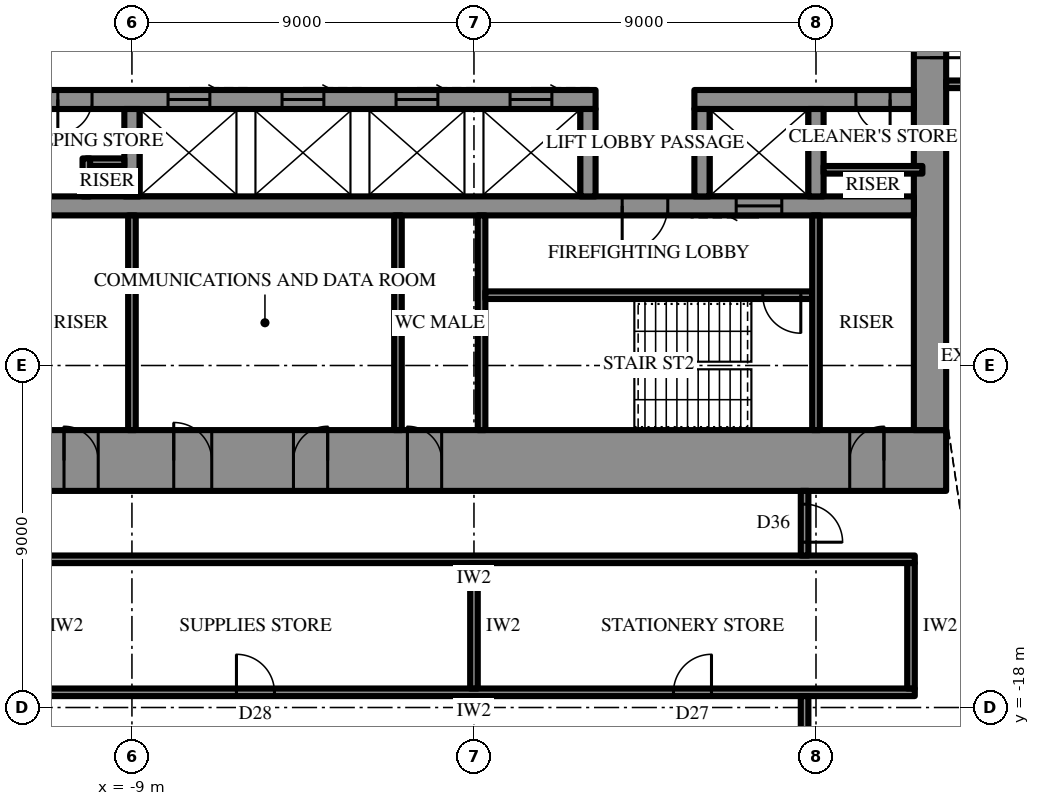
"""IFC4 building model, lengths in metres.
Left out: names, types, materials, properties, quantities, classifications, styles, units other than length and angle.
Written with IfcOpenShell. Run it as: python <this file> out.ifc"""

import sys

from ifc_helpers import new_model, si_unit, direction, frame, frame_2d, origin, place, context, subcontext, project, spatial, rectangle, extrude, element, fill, save


model = new_model("IFC4")
c1 = context("Model", 3, precision=1e-05, world=origin(), true_north=direction((0.0, 1.0)))
c2 = subcontext(c1, "Body", "Model", "MODEL_VIEW")
j1 = project(units=[si_unit("LENGTHUNIT", "METRE"), si_unit("PLANEANGLEUNIT", "RADIAN")], contexts=[c1])
p1 = place(None, origin())
s1 = spatial("IfcSite", under=j1, at=p1, CompositionType="ELEMENT")
p2 = place(p1, origin())
s2 = spatial("IfcBuilding", under=s1, at=p2, CompositionType="ELEMENT")
p3 = place(p2, frame((0.0, 0.0, 349.3)))
s3 = spatial("IfcBuildingStorey", under=s2, at=p3, CompositionType="ELEMENT", Elevation=349.3)
p4 = place(p3, frame((12.425, -11.5, 0.0), z_axis=(0.0, 0.0, 1.0), x_axis=(-1.0, 0.0, 0.0)))
e1 = element("IfcWall", 1, at=p4, inside=s3, PredefinedType="SHEAR", context=c2, shape_type="SweptSolid", body=[
    extrude(rectangle(XDim=24.85, YDim=1.6, at=frame_2d((12.425, 0.0))), origin(), (0.0, 0.0, 1.0), 4.2),
])
p5 = place(p4, frame((13.275, 0.0, 0.0)))
e2 = element("IfcOpeningElement", 2, at=p5, cuts=e1, PredefinedType="OPENING", context=c2, shape_type="SweptSolid", body=[
    extrude(rectangle(XDim=0.9, YDim=2.2, at=frame_2d((0.45, 1.1))), frame((0.0, 0.81, 0.0), z_axis=(0.0, -1.0, 0.0), x_axis=(1.0, 0.0, 0.0)), (0.0, 0.0, 1.0), 1.62),
])
p6 = place(p4, frame((16.275, 0.0, 0.0)))
e3 = element("IfcOpeningElement", 3, at=p6, cuts=e1, PredefinedType="OPENING", context=c2, shape_type="SweptSolid", body=[
    extrude(rectangle(XDim=0.9, YDim=2.2, at=frame_2d((0.45, 1.1))), frame((0.0, 0.81, 0.0), z_axis=(0.0, -1.0, 0.0), x_axis=(1.0, 0.0, 0.0)), (0.0, 0.0, 1.0), 1.62),
])
p7 = place(p4, frame((19.325, 0.0, 0.0)))
e4 = element("IfcOpeningElement", 4, at=p7, cuts=e1, PredefinedType="OPENING", context=c2, shape_type="SweptSolid", body=[
    extrude(rectangle(XDim=1.0, YDim=2.2, at=frame_2d((0.5, 1.1))), frame((0.0, 0.81, 0.0), z_axis=(0.0, -1.0, 0.0), x_axis=(1.0, 0.0, 0.0)), (0.0, 0.0, 1.0), 1.62),
])
p8 = place(p4, frame((1.637, 0.0, 0.0)))
e5 = element("IfcOpeningElement", 5, at=p8, cuts=e1, PredefinedType="OPENING", context=c2, shape_type="SweptSolid", body=[
    extrude(rectangle(XDim=0.9, YDim=2.2, at=frame_2d((0.45, 1.1))), frame((0.0, 0.81, 0.0), z_axis=(0.0, -1.0, 0.0), x_axis=(1.0, 0.0, 0.0)), (0.0, 0.0, 1.0), 1.62),
])
p9 = place(p4, frame((22.312, 0.0, 0.0)))
e6 = element("IfcOpeningElement", 6, at=p9, cuts=e1, PredefinedType="OPENING", context=c2, shape_type="SweptSolid", body=[
    extrude(rectangle(XDim=0.9, YDim=2.2, at=frame_2d((0.45, 1.1))), frame((0.0, 0.81, 0.0), z_axis=(0.0, -1.0, 0.0), x_axis=(1.0, 0.0, 0.0)), (0.0, 0.0, 1.0), 1.62),
])
p10 = place(p3, frame((12.0, -10.7, 0.0), z_axis=(0.0, 0.0, 1.0), x_axis=(0.0, 1.0, 0.0)))
e7 = element("IfcWall", 7, at=p10, inside=s3, PredefinedType="SHEAR", context=c2, shape_type="SweptSolid", body=[
    extrude(rectangle(XDim=21.4, YDim=0.85, at=frame_2d((10.7, 0.0))), origin(), (0.0, 0.0, 1.0), 4.2),
])
p11 = place(p10, frame((9.8, 0.0, 0.0)))
e8 = element("IfcOpeningElement", 8, at=p11, cuts=e7, PredefinedType="OPENING", context=c2, shape_type="SweptSolid", body=[
    extrude(rectangle(XDim=1.8, YDim=2.4, at=frame_2d((0.9, 1.2))), frame((0.0, 0.435, 0.0), z_axis=(0.0, -1.0, 0.0), x_axis=(1.0, 0.0, 0.0)), (0.0, 0.0, 1.0), 0.87),
])
p12 = place(p3, frame((11.575, -2.0, 0.0), z_axis=(0.0, 0.0, 1.0), x_axis=(-1.0, 0.0, 0.0)))
e9 = element("IfcWall", 9, at=p12, inside=s3, PredefinedType="SHEAR", context=c2, shape_type="SweptSolid", body=[
    extrude(rectangle(XDim=5.775, YDim=0.5, at=frame_2d((2.887, 0.0))), origin(), (0.0, 0.0, 1.0), 4.2),
])
p13 = place(p12, frame((0.625, 0.0, 0.0)))
e10 = element("IfcOpeningElement", 10, at=p13, cuts=e9, PredefinedType="OPENING", context=c2, shape_type="SweptSolid", body=[
    extrude(rectangle(XDim=0.9, YDim=2.2, at=frame_2d((0.45, 1.1))), frame((0.0, 0.26, 0.0), z_axis=(0.0, -1.0, 0.0), x_axis=(1.0, 0.0, 0.0)), (0.0, 0.0, 1.0), 0.52),
])
p14 = place(p3, frame((3.2, -2.0, 0.0), z_axis=(0.0, 0.0, 1.0), x_axis=(-1.0, 0.0, 0.0)))
e11 = element("IfcWall", 11, at=p14, inside=s3, PredefinedType="SHEAR", context=c2, shape_type="SweptSolid", body=[
    extrude(rectangle(XDim=14.775, YDim=0.5, at=frame_2d((7.387, 0.0))), origin(), (0.0, 0.0, 1.0), 4.2),
])
p15 = place(p14, frame((13.25, 0.0, 0.0)))
e12 = element("IfcOpeningElement", 12, at=p15, cuts=e11, PredefinedType="OPENING", context=c2, shape_type="SweptSolid", body=[
    extrude(rectangle(XDim=0.9, YDim=2.2, at=frame_2d((0.45, 1.1))), frame((0.0, 0.26, 0.0), z_axis=(0.0, -1.0, 0.0), x_axis=(1.0, 0.0, 0.0)), (0.0, 0.0, 1.0), 0.52),
])
p16 = place(p14, frame((1.15, 0.0, 0.0)))
e13 = element("IfcOpeningElement", 13, at=p16, cuts=e11, PredefinedType="OPENING", context=c2, shape_type="SweptSolid", body=[
    extrude(rectangle(XDim=1.1, YDim=2.2, at=frame_2d((0.55, 1.1))), frame((0.0, 0.26, 0.0), z_axis=(0.0, -1.0, 0.0), x_axis=(1.0, 0.0, 0.0)), (0.0, 0.0, 1.0), 0.52),
])
p17 = place(p14, frame((4.15, 0.0, 0.0)))
e14 = element("IfcOpeningElement", 14, at=p17, cuts=e11, PredefinedType="OPENING", context=c2, shape_type="SweptSolid", body=[
    extrude(rectangle(XDim=1.1, YDim=2.2, at=frame_2d((0.55, 1.1))), frame((0.0, 0.26, 0.0), z_axis=(0.0, -1.0, 0.0), x_axis=(1.0, 0.0, 0.0)), (0.0, 0.0, 1.0), 0.52),
])
p18 = place(p14, frame((7.15, 0.0, 0.0)))
e15 = element("IfcOpeningElement", 15, at=p18, cuts=e11, PredefinedType="OPENING", context=c2, shape_type="SweptSolid", body=[
    extrude(rectangle(XDim=1.1, YDim=2.2, at=frame_2d((0.55, 1.1))), frame((0.0, 0.26, 0.0), z_axis=(0.0, -1.0, 0.0), x_axis=(1.0, 0.0, 0.0)), (0.0, 0.0, 1.0), 0.52),
])
p19 = place(p14, frame((10.15, 0.0, 0.0)))
e16 = element("IfcOpeningElement", 16, at=p19, cuts=e11, PredefinedType="OPENING", context=c2, shape_type="SweptSolid", body=[
    extrude(rectangle(XDim=1.1, YDim=2.2, at=frame_2d((0.55, 1.1))), frame((0.0, 0.26, 0.0), z_axis=(0.0, -1.0, 0.0), x_axis=(1.0, 0.0, 0.0)), (0.0, 0.0, 1.0), 0.52),
])
p20 = place(p3, frame((11.575, -4.8, 0.0), z_axis=(0.0, 0.0, 1.0), x_axis=(-1.0, 0.0, 0.0)))
e17 = element("IfcWall", 17, at=p20, inside=s3, PredefinedType="SHEAR", context=c2, shape_type="SweptSolid", body=[
    extrude(rectangle(XDim=23.15, YDim=0.5, at=frame_2d((11.575, 0.0))), origin(), (0.0, 0.0, 1.0), 4.2),
])
p21 = place(p20, frame((6.475, 0.0, 0.0)))
e18 = element("IfcOpeningElement", 18, at=p21, cuts=e17, PredefinedType="OPENING", context=c2, shape_type="SweptSolid", body=[
    extrude(rectangle(XDim=1.2, YDim=2.2, at=frame_2d((0.6, 1.1))), frame((0.0, 0.26, 0.0), z_axis=(0.0, -1.0, 0.0), x_axis=(1.0, 0.0, 0.0)), (0.0, 0.0, 1.0), 0.52),
])
p22 = place(p20, frame((3.475, 0.0, 0.0)))
e19 = element("IfcOpeningElement", 19, at=p22, cuts=e17, PredefinedType="OPENING", context=c2, shape_type="SweptSolid", body=[
    extrude(rectangle(XDim=1.2, YDim=2.2, at=frame_2d((0.6, 1.1))), frame((0.0, 0.26, 0.0), z_axis=(0.0, -1.0, 0.0), x_axis=(1.0, 0.0, 0.0)), (0.0, 0.0, 1.0), 0.52),
])
for number, where, z_axis, x_axis in (
    (20, (9.0, -2.25, 0.0), (0.0, 0.0, 1.0), (0.0, -1.0, 0.0)),
    (21, (6.0, -2.25, 0.0), (0.0, 0.0, 1.0), (0.0, -1.0, 0.0)),
    (22, (3.0, -2.25, 0.0), (0.0, 0.0, 1.0), (0.0, -1.0, 0.0)),
    (23, (-9.0, -2.25, 0.0), (0.0, 0.0, 1.0), (0.0, -1.0, 0.0)),
):
    element("IfcWall", number, at=place(p3, frame(where, z_axis=z_axis, x_axis=x_axis)), inside=s3, PredefinedType="SHEAR", context=c2, shape_type="SweptSolid", body=[
        extrude(rectangle(XDim=2.3, YDim=0.4, at=frame_2d((1.15, 0.0))), origin(), (0.0, 0.0, 1.0), 4.2),
    ])
p23 = place(p3, frame((0.2, -5.05, 0.0), z_axis=(0.0, 0.0, 1.0), x_axis=(0.0, -1.0, 0.0)))
e24 = element("IfcWall", 24, at=p23, inside=s3, PredefinedType="SHEAR", context=c2, shape_type="SweptSolid", body=[
    extrude(rectangle(XDim=5.65, YDim=0.2, at=frame_2d((2.825, 0.0))), origin(), (0.0, 0.0, 1.0), 4.2),
])
p24 = place(p3, frame((8.9, -7.15, 0.0), z_axis=(0.0, 0.0, 1.0), x_axis=(-1.0, 0.0, 0.0)))
e25 = element("IfcWall", 25, at=p24, inside=s3, PredefinedType="SHEAR", context=c2, shape_type="SweptSolid", body=[
    extrude(rectangle(XDim=8.6, YDim=0.2, at=frame_2d((4.3, 0.0))), origin(), (0.0, 0.0, 1.0), 4.2),
])
p25 = place(p24, frame((0.3, 0.0, 0.0)))
e26 = element("IfcOpeningElement", 26, at=p25, cuts=e25, PredefinedType="OPENING", context=c2, shape_type="SweptSolid", body=[
    extrude(rectangle(XDim=1.0, YDim=2.2, at=frame_2d((0.5, 1.1))), frame((0.0, 0.11, 0.0), z_axis=(0.0, -1.0, 0.0), x_axis=(1.0, 0.0, 0.0)), (0.0, 0.0, 1.0), 0.22),
])
for number, where, z_axis, x_axis in (
    (27, (9.0, -5.05, 0.0), (0.0, 0.0, 1.0), (0.0, -1.0, 0.0)),
    (28, (-9.0, -5.05, 0.0), (0.0, 0.0, 1.0), (0.0, -1.0, 0.0)),
    (29, (-2.0, -5.05, 0.0), (0.0, 0.0, 1.0), (0.0, -1.0, 0.0)),
):
    element("IfcWall", number, at=place(p3, frame(where, z_axis=z_axis, x_axis=x_axis)), inside=s3, PredefinedType="PARTITIONING", context=c2, shape_type="SweptSolid", body=[
        extrude(rectangle(XDim=5.65, YDim=0.2, at=frame_2d((2.825, 0.0))), origin(), (0.0, 0.0, 1.0), 4.0),
    ])
p26 = place(p3, frame((11.8, -3.85, 0.0), z_axis=(0.0, 0.0, 1.0), x_axis=(-1.0, 0.0, 0.0)))
e30 = element("IfcWall", 30, at=p26, inside=s3, PredefinedType="PARTITIONING", context=c2, shape_type="SweptSolid", body=[
    extrude(rectangle(XDim=2.6, YDim=0.2, at=frame_2d((1.3, 0.0))), origin(), (0.0, 0.0, 1.0), 4.0),
])
for number, where, z_axis, x_axis in (
    (31, (-9.2, -3.65, 0.0), (0.0, 0.0, 1.0), (-1.0, 0.0, 0.0)),
    (32, (-10.2, -3.55, 0.0), (0.0, 0.0, 1.0), (0.0, -1.0, 0.0)),
):
    element("IfcWall", number, at=place(p3, frame(where, z_axis=z_axis, x_axis=x_axis)), inside=s3, PredefinedType="PARTITIONING", context=c2, shape_type="SweptSolid", body=[
        extrude(rectangle(XDim=1.0, YDim=0.2, at=frame_2d((0.5, 0.0))), origin(), (0.0, 0.0, 1.0), 4.0),
    ])
p27 = place(p3, frame((11.6, -14.1, 0.0), z_axis=(0.0, 0.0, 1.0), x_axis=(-1.0, 0.0, 0.0)))
e33 = element("IfcWall", 33, at=p27, inside=s3, PredefinedType="PARTITIONING", context=c2, shape_type="SweptSolid", body=[
    extrude(rectangle(XDim=23.2, YDim=0.2, at=frame_2d((11.6, 0.0))), origin(), (0.0, 0.0, 1.0), 4.0),
])
p28 = place(p3, frame((11.6, -17.6, 0.0), z_axis=(0.0, 0.0, 1.0), x_axis=(-1.0, 0.0, 0.0)))
e34 = element("IfcWall", 34, at=p28, inside=s3, PredefinedType="PARTITIONING", context=c2, shape_type="SweptSolid", body=[
    extrude(rectangle(XDim=23.2, YDim=0.2, at=frame_2d((11.6, 0.0))), origin(), (0.0, 0.0, 1.0), 4.0),
])
p29 = place(p28, frame((5.35, 0.0, 0.0)))
e35 = element("IfcOpeningElement", 35, at=p29, cuts=e34, PredefinedType="OPENING", context=c2, shape_type="SweptSolid", body=[
    extrude(rectangle(XDim=1.0, YDim=2.2, at=frame_2d((0.5, 1.1))), frame((0.0, 0.11, 0.0), z_axis=(0.0, -1.0, 0.0), x_axis=(1.0, 0.0, 0.0)), (0.0, 0.0, 1.0), 0.22),
])
p30 = place(p28, frame((16.85, 0.0, 0.0)))
e36 = element("IfcOpeningElement", 36, at=p30, cuts=e34, PredefinedType="OPENING", context=c2, shape_type="SweptSolid", body=[
    extrude(rectangle(XDim=1.0, YDim=2.2, at=frame_2d((0.5, 1.1))), frame((0.0, 0.11, 0.0), z_axis=(0.0, -1.0, 0.0), x_axis=(1.0, 0.0, 0.0)), (0.0, 0.0, 1.0), 0.22),
])
p31 = place(p3, frame((11.5, -14.2, 0.0), z_axis=(0.0, 0.0, 1.0), x_axis=(0.0, -1.0, 0.0)))
e37 = element("IfcWall", 37, at=p31, inside=s3, PredefinedType="PARTITIONING", context=c2, shape_type="SweptSolid", body=[
    extrude(rectangle(XDim=3.3, YDim=0.2, at=frame_2d((1.65, 0.0))), origin(), (0.0, 0.0, 1.0), 4.0),
])
p32 = place(p3, frame((0.0, -14.2, 0.0), z_axis=(0.0, 0.0, 1.0), x_axis=(0.0, -1.0, 0.0)))
e38 = element("IfcWall", 38, at=p32, inside=s3, PredefinedType="PARTITIONING", context=c2, shape_type="SweptSolid", body=[
    extrude(rectangle(XDim=3.3, YDim=0.2, at=frame_2d((1.65, 0.0))), origin(), (0.0, 0.0, 1.0), 2.992),
])
p33 = place(p3, frame((8.7, -12.3, 0.0), z_axis=(0.0, 0.0, 1.0), x_axis=(0.0, -1.0, 0.0)))
e39 = element("IfcWall", 39, at=p33, inside=s3, PredefinedType="PARTITIONING", context=c2, shape_type="SweptSolid", body=[
    extrude(rectangle(XDim=1.7, YDim=0.2, at=frame_2d((0.85, 0.0))), origin(), (0.0, 0.0, 1.0), 2.992),
])
p34 = place(p33, frame((0.35, 0.0, 0.0)))
e40 = element("IfcOpeningElement", 40, at=p34, cuts=e39, PredefinedType="OPENING", context=c2, shape_type="SweptSolid", body=[
    extrude(rectangle(XDim=1.0, YDim=2.2, at=frame_2d((0.5, 1.1))), frame((0.0, 0.11, 0.0), z_axis=(0.0, -1.0, 0.0), x_axis=(1.0, 0.0, 0.0)), (0.0, 0.0, 1.0), 0.22),
])
p35 = place(p3, frame((8.7, -17.7, 0.0), z_axis=(0.0, 0.0, 1.0), x_axis=(0.0, -1.0, 0.0)))
e41 = element("IfcWall", 41, at=p35, inside=s3, PredefinedType="PARTITIONING", context=c2, shape_type="SweptSolid", body=[
    extrude(rectangle(XDim=8.15, YDim=0.2, at=frame_2d((4.075, 0.0))), origin(), (0.0, 0.0, 1.0), 2.992),
])
p36 = place(p3, frame((12.425, -1.6, 0.0), z_axis=(0.0, 0.0, 1.0), x_axis=(1.0, 0.0, 0.0)))
e42 = element("IfcWall", 42, at=p36, inside=s3, PredefinedType="PARTITIONING", context=c2, shape_type="SweptSolid", body=[
    extrude(rectangle(XDim=16.5, YDim=0.2, at=frame_2d((8.25, 0.0))), origin(), (0.0, 0.0, 1.0), 4.0),
])
p37 = place(p36, frame((1.15, 0.0, 0.0)))
e43 = element("IfcOpeningElement", 43, at=p37, cuts=e42, PredefinedType="OPENING", context=c2, shape_type="SweptSolid", body=[
    extrude(rectangle(XDim=1.0, YDim=2.2, at=frame_2d((0.5, 1.1))), frame((0.0, 0.11, 0.0), z_axis=(0.0, -1.0, 0.0), x_axis=(1.0, 0.0, 0.0)), (0.0, 0.0, 1.0), 0.22),
])
p38 = place(p11, frame((1.8, 0.0, 0.0), z_axis=(0.0, 0.0, 1.0), x_axis=(-1.0, 0.0, 0.0)))
e44 = element("IfcDoor", 44, at=p38, inside=s3, OperationType="DOUBLE_DOOR_SINGLE_SWING", PredefinedType="DOOR", context=c2, shape_type="SweptSolid", body=[
    extrude(rectangle(XDim=1.8, YDim=2.4, at=frame_2d((0.9, 1.2))), frame((0.0, 0.025, 0.0), z_axis=(0.0, -1.0, 0.0), x_axis=(1.0, 0.0, 0.0)), (0.0, 0.0, 1.0), 0.05),
])
fill(e8, e44)
p39 = place(p21, origin())
e45 = element("IfcDoor", 45, at=p39, inside=s3, OperationType="SINGLE_SWING_LEFT", PredefinedType="DOOR", context=c2, shape_type="SweptSolid", body=[
    extrude(rectangle(XDim=1.2, YDim=2.2, at=frame_2d((0.6, 1.1))), frame((0.0, 0.025, 0.0), z_axis=(0.0, -1.0, 0.0), x_axis=(1.0, 0.0, 0.0)), (0.0, 0.0, 1.0), 0.05),
])
fill(e18, e45)
p40 = place(p25, origin())
e46 = element("IfcDoor", 46, at=p40, inside=s3, OperationType="SINGLE_SWING_RIGHT", PredefinedType="DOOR", context=c2, shape_type="SweptSolid", body=[
    extrude(rectangle(XDim=1.0, YDim=2.2, at=frame_2d((0.5, 1.1))), frame((0.0, 0.025, 0.0), z_axis=(0.0, -1.0, 0.0), x_axis=(1.0, 0.0, 0.0)), (0.0, 0.0, 1.0), 0.05),
])
fill(e26, e46)
p41 = place(p5, frame((0.9, 0.0, 0.0), z_axis=(0.0, 0.0, 1.0), x_axis=(-1.0, 0.0, 0.0)))
e47 = element("IfcDoor", 47, at=p41, inside=s3, OperationType="SINGLE_SWING_RIGHT", PredefinedType="DOOR", context=c2, shape_type="SweptSolid", body=[
    extrude(rectangle(XDim=0.9, YDim=2.2, at=frame_2d((0.45, 1.1))), frame((0.0, 0.025, 0.0), z_axis=(0.0, -1.0, 0.0), x_axis=(1.0, 0.0, 0.0)), (0.0, 0.0, 1.0), 0.05),
])
fill(e2, e47)
p42 = place(p6, frame((0.9, 0.0, 0.0), z_axis=(0.0, 0.0, 1.0), x_axis=(-1.0, 0.0, 0.0)))
e48 = element("IfcDoor", 48, at=p42, inside=s3, OperationType="SINGLE_SWING_LEFT", PredefinedType="DOOR", context=c2, shape_type="SweptSolid", body=[
    extrude(rectangle(XDim=0.9, YDim=2.2, at=frame_2d((0.45, 1.1))), frame((0.0, 0.025, 0.0), z_axis=(0.0, -1.0, 0.0), x_axis=(1.0, 0.0, 0.0)), (0.0, 0.0, 1.0), 0.05),
])
fill(e3, e48)
p43 = place(p7, frame((1.0, 0.0, 0.0), z_axis=(0.0, 0.0, 1.0), x_axis=(-1.0, 0.0, 0.0)))
e49 = element("IfcDoor", 49, at=p43, inside=s3, OperationType="SINGLE_SWING_RIGHT", PredefinedType="DOOR", context=c2, shape_type="SweptSolid", body=[
    extrude(rectangle(XDim=1.0, YDim=2.2, at=frame_2d((0.5, 1.1))), frame((0.0, 0.025, 0.0), z_axis=(0.0, -1.0, 0.0), x_axis=(1.0, 0.0, 0.0)), (0.0, 0.0, 1.0), 0.05),
])
fill(e4, e49)
p44 = place(p8, frame((0.9, 0.0, 0.0), z_axis=(0.0, 0.0, 1.0), x_axis=(-1.0, 0.0, 0.0)))
e50 = element("IfcDoor", 50, at=p44, inside=s3, OperationType="SINGLE_SWING_LEFT", PredefinedType="DOOR", context=c2, shape_type="SweptSolid", body=[
    extrude(rectangle(XDim=0.9, YDim=2.2, at=frame_2d((0.45, 1.1))), frame((0.0, 0.025, 0.0), z_axis=(0.0, -1.0, 0.0), x_axis=(1.0, 0.0, 0.0)), (0.0, 0.0, 1.0), 0.05),
])
fill(e5, e50)
p45 = place(p9, frame((0.9, 0.0, 0.0), z_axis=(0.0, 0.0, 1.0), x_axis=(-1.0, 0.0, 0.0)))
e51 = element("IfcDoor", 51, at=p45, inside=s3, OperationType="SINGLE_SWING_RIGHT", PredefinedType="DOOR", context=c2, shape_type="SweptSolid", body=[
    extrude(rectangle(XDim=0.9, YDim=2.2, at=frame_2d((0.45, 1.1))), frame((0.0, 0.025, 0.0), z_axis=(0.0, -1.0, 0.0), x_axis=(1.0, 0.0, 0.0)), (0.0, 0.0, 1.0), 0.05),
])
fill(e6, e51)
p46 = place(p13, origin())
e52 = element("IfcDoor", 52, at=p46, inside=s3, OperationType="SINGLE_SWING_RIGHT", PredefinedType="DOOR", context=c2, shape_type="SweptSolid", body=[
    extrude(rectangle(XDim=0.9, YDim=2.2, at=frame_2d((0.45, 1.1))), frame((0.0, 0.025, 0.0), z_axis=(0.0, -1.0, 0.0), x_axis=(1.0, 0.0, 0.0)), (0.0, 0.0, 1.0), 0.05),
])
fill(e10, e52)
p47 = place(p15, origin())
e53 = element("IfcDoor", 53, at=p47, inside=s3, OperationType="SINGLE_SWING_LEFT", PredefinedType="DOOR", context=c2, shape_type="SweptSolid", body=[
    extrude(rectangle(XDim=0.9, YDim=2.2, at=frame_2d((0.45, 1.1))), frame((0.0, 0.025, 0.0), z_axis=(0.0, -1.0, 0.0), x_axis=(1.0, 0.0, 0.0)), (0.0, 0.0, 1.0), 0.05),
])
fill(e12, e53)
p48 = place(p22, origin())
e54 = element("IfcDoor", 54, at=p48, inside=s3, OperationType="SLIDING_TO_LEFT", PredefinedType="DOOR", context=c2, shape_type="SweptSolid", body=[
    extrude(rectangle(XDim=1.2, YDim=2.2, at=frame_2d((0.6, 1.1))), frame((0.0, 0.025, 0.0), z_axis=(0.0, -1.0, 0.0), x_axis=(1.0, 0.0, 0.0)), (0.0, 0.0, 1.0), 0.05),
])
fill(e19, e54)
p49 = place(p16, frame((1.1, 0.0, 0.0), z_axis=(0.0, 0.0, 1.0), x_axis=(-1.0, 0.0, 0.0)))
e55 = element("IfcDoor", 55, at=p49, inside=s3, OperationType="SLIDING_TO_LEFT", PredefinedType="DOOR", context=c2, shape_type="SweptSolid", body=[
    extrude(rectangle(XDim=1.1, YDim=2.2, at=frame_2d((0.55, 1.1))), frame((0.0, 0.025, 0.0), z_axis=(0.0, -1.0, 0.0), x_axis=(1.0, 0.0, 0.0)), (0.0, 0.0, 1.0), 0.05),
])
fill(e13, e55)
p50 = place(p17, frame((1.1, 0.0, 0.0), z_axis=(0.0, 0.0, 1.0), x_axis=(-1.0, 0.0, 0.0)))
e56 = element("IfcDoor", 56, at=p50, inside=s3, OperationType="SLIDING_TO_LEFT", PredefinedType="DOOR", context=c2, shape_type="SweptSolid", body=[
    extrude(rectangle(XDim=1.1, YDim=2.2, at=frame_2d((0.55, 1.1))), frame((0.0, 0.025, 0.0), z_axis=(0.0, -1.0, 0.0), x_axis=(1.0, 0.0, 0.0)), (0.0, 0.0, 1.0), 0.05),
])
fill(e14, e56)
p51 = place(p18, frame((1.1, 0.0, 0.0), z_axis=(0.0, 0.0, 1.0), x_axis=(-1.0, 0.0, 0.0)))
e57 = element("IfcDoor", 57, at=p51, inside=s3, OperationType="SLIDING_TO_LEFT", PredefinedType="DOOR", context=c2, shape_type="SweptSolid", body=[
    extrude(rectangle(XDim=1.1, YDim=2.2, at=frame_2d((0.55, 1.1))), frame((0.0, 0.025, 0.0), z_axis=(0.0, -1.0, 0.0), x_axis=(1.0, 0.0, 0.0)), (0.0, 0.0, 1.0), 0.05),
])
fill(e15, e57)
p52 = place(p19, frame((1.1, 0.0, 0.0), z_axis=(0.0, 0.0, 1.0), x_axis=(-1.0, 0.0, 0.0)))
e58 = element("IfcDoor", 58, at=p52, inside=s3, OperationType="SLIDING_TO_LEFT", PredefinedType="DOOR", context=c2, shape_type="SweptSolid", body=[
    extrude(rectangle(XDim=1.1, YDim=2.2, at=frame_2d((0.55, 1.1))), frame((0.0, 0.025, 0.0), z_axis=(0.0, -1.0, 0.0), x_axis=(1.0, 0.0, 0.0)), (0.0, 0.0, 1.0), 0.05),
])
fill(e16, e58)
p53 = place(p29, frame((1.0, 0.0, 0.0), z_axis=(0.0, 0.0, 1.0), x_axis=(-1.0, 0.0, 0.0)))
e59 = element("IfcDoor", 59, at=p53, inside=s3, OperationType="SINGLE_SWING_LEFT", PredefinedType="DOOR", context=c2, shape_type="SweptSolid", body=[
    extrude(rectangle(XDim=1.0, YDim=2.2, at=frame_2d((0.5, 1.1))), frame((0.0, 0.025, 0.0), z_axis=(0.0, -1.0, 0.0), x_axis=(1.0, 0.0, 0.0)), (0.0, 0.0, 1.0), 0.05),
])
fill(e35, e59)
p54 = place(p30, frame((1.0, 0.0, 0.0), z_axis=(0.0, 0.0, 1.0), x_axis=(-1.0, 0.0, 0.0)))
e60 = element("IfcDoor", 60, at=p54, inside=s3, OperationType="SINGLE_SWING_RIGHT", PredefinedType="DOOR", context=c2, shape_type="SweptSolid", body=[
    extrude(rectangle(XDim=1.0, YDim=2.2, at=frame_2d((0.5, 1.1))), frame((0.0, 0.025, 0.0), z_axis=(0.0, -1.0, 0.0), x_axis=(1.0, 0.0, 0.0)), (0.0, 0.0, 1.0), 0.05),
])
fill(e36, e60)
p55 = place(p34, origin())
e61 = element("IfcDoor", 61, at=p55, inside=s3, OperationType="SINGLE_SWING_LEFT", PredefinedType="DOOR", context=c2, shape_type="SweptSolid", body=[
    extrude(rectangle(XDim=1.0, YDim=2.2, at=frame_2d((0.5, 1.1))), frame((0.0, 0.025, 0.0), z_axis=(0.0, -1.0, 0.0), x_axis=(1.0, 0.0, 0.0)), (0.0, 0.0, 1.0), 0.05),
])
fill(e40, e61)
save(model, sys.argv[1])
